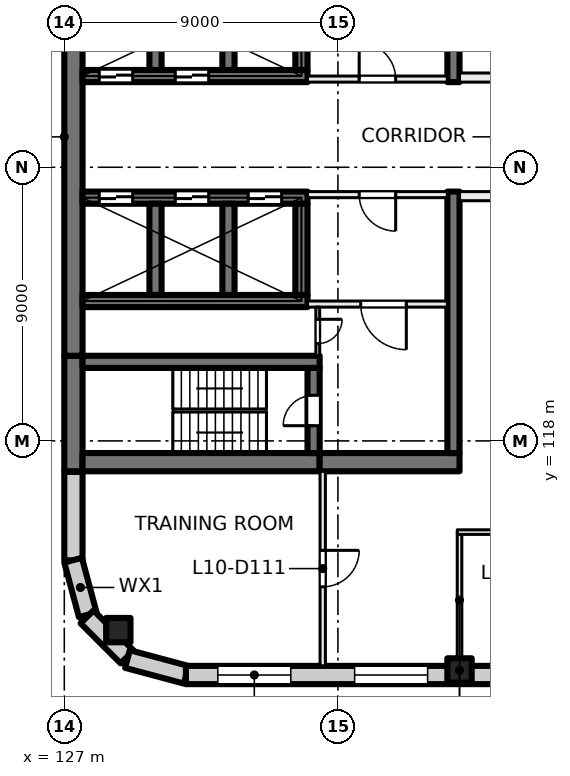
"""IFC4 building model, lengths in metres.
Left out: names, types, materials, properties, quantities, classifications, styles, units other than length and angle.
Written with IfcOpenShell. Run it as: python <this file> out.ifc"""

import sys

from ifc_helpers import new_model, si_unit, direction, frame, frame_2d, origin, origin_2d, place, context, subcontext, project, spatial, rectangle, extrude, element, fill, save


model = new_model("IFC4")
c1 = context("Model", 3, precision=1e-05, world=origin(), true_north=direction((0.0, 1.0)))
c2 = subcontext(c1, "Body", "Model", "MODEL_VIEW")
j1 = project(units=[si_unit("LENGTHUNIT", "METRE"), si_unit("PLANEANGLEUNIT", "RADIAN")], contexts=[c1])
p1 = place(None, origin())
s1 = spatial("IfcSite", under=j1, at=p1, CompositionType="ELEMENT")
p2 = place(p1, origin())
s2 = spatial("IfcBuilding", under=s1, at=p2, CompositionType="ELEMENT")
p3 = place(p2, frame((0.0, 0.0, 47.5)))
s3 = spatial("IfcBuildingStorey", under=s2, at=p3, CompositionType="ELEMENT", Elevation=47.5)
for number, where, z_axis, x_axis in (
    (1, (128.777, 111.777, 0.0), (0.0, 0.0, 1.0), (1.0, 0.0, 0.0)),
    (2, (140.0, 110.45, 0.0), (0.0, 0.0, 1.0), (1.0, 0.0, 0.0)),
):
    element("IfcColumn", number, at=place(p3, frame(where, z_axis=z_axis, x_axis=x_axis)), inside=s3, PredefinedType="COLUMN", context=c2, shape_type="SweptSolid", body=[
        extrude(rectangle(XDim=0.8, YDim=0.8, at=origin_2d()), origin(), (0.0, 0.0, 1.0), 4.0),
    ])
p4 = place(p3, frame((127.3, 117.0, 0.0), z_axis=(0.0, 0.0, 1.0), x_axis=(0.0, 1.0, 0.0)))
e3 = element("IfcWall", 3, at=p4, inside=s3, PredefinedType="SHEAR", context=c2, shape_type="SweptSolid", body=[
    extrude(rectangle(XDim=3.8, YDim=0.6, at=frame_2d((1.9, 0.0))), origin(), (0.0, 0.0, 1.0), 4.0),
])
p5 = place(p3, frame((127.3, 120.8, 0.0), z_axis=(0.0, 0.0, 1.0), x_axis=(0.0, 1.0, 0.0)))
e4 = element("IfcWall", 4, at=p5, inside=s3, PredefinedType="SHEAR", context=c2, shape_type="SweptSolid", body=[
    extrude(rectangle(XDim=14.4, YDim=0.6, at=frame_2d((7.2, 0.0))), origin(), (0.0, 0.0, 1.0), 4.0),
])
p6 = place(p3, frame((127.6, 117.3, 0.0), z_axis=(0.0, 0.0, 1.0), x_axis=(1.0, 0.0, 0.0)))
e5 = element("IfcWall", 5, at=p6, inside=s3, PredefinedType="SHEAR", context=c2, shape_type="SweptSolid", body=[
    extrude(rectangle(XDim=7.8, YDim=0.6, at=frame_2d((3.9, 0.0))), origin(), (0.0, 0.0, 1.0), 4.0),
])
p7 = place(p3, frame((135.4, 117.3, 0.0), z_axis=(0.0, 0.0, 1.0), x_axis=(1.0, 0.0, 0.0)))
e6 = element("IfcWall", 6, at=p7, inside=s3, PredefinedType="SHEAR", context=c2, shape_type="SweptSolid", body=[
    extrude(rectangle(XDim=4.6, YDim=0.6, at=frame_2d((2.3, 0.0))), origin(), (0.0, 0.0, 1.0), 4.0),
])
p8 = place(p3, frame((127.6, 120.6, 0.0), z_axis=(0.0, 0.0, 1.0), x_axis=(1.0, 0.0, 0.0)))
e7 = element("IfcWall", 7, at=p8, inside=s3, PredefinedType="SHEAR", context=c2, shape_type="SweptSolid", body=[
    extrude(rectangle(XDim=7.8, YDim=0.4, at=frame_2d((3.9, 0.0))), origin(), (0.0, 0.0, 1.0), 4.0),
])
p9 = place(p3, frame((135.2, 117.6, 0.0), z_axis=(0.0, 0.0, 1.0), x_axis=(0.0, 1.0, 0.0)))
e8 = element("IfcWall", 8, at=p9, inside=s3, PredefinedType="SHEAR", context=c2, shape_type="SweptSolid", body=[
    extrude(rectangle(XDim=2.8, YDim=0.4, at=frame_2d((1.4, 0.0))), origin(), (0.0, 0.0, 1.0), 4.0),
])
p10 = place(p9, frame((0.9, 0.0, 0.0)))
e9 = element("IfcOpeningElement", 9, at=p10, cuts=e8, PredefinedType="OPENING", context=c2, shape_type="SweptSolid", body=[
    extrude(rectangle(XDim=1.0, YDim=2.1, at=frame_2d((0.5, 1.05))), frame((0.0, 0.21, 0.0), z_axis=(0.0, -1.0, 0.0), x_axis=(1.0, 0.0, 0.0)), (0.0, 0.0, 1.0), 0.42),
])
p11 = place(p3, frame((127.6, 126.0, 0.0), z_axis=(0.0, 0.0, 1.0), x_axis=(1.0, 0.0, 0.0)))
e10 = element("IfcWall", 10, at=p11, inside=s3, PredefinedType="SHEAR", context=c2, shape_type="SweptSolid", body=[
    extrude(rectangle(XDim=7.4, YDim=0.4, at=frame_2d((3.7, 0.0))), origin(), (0.0, 0.0, 1.0), 4.0),
])
p12 = place(p11, frame((0.55, 0.0, 0.0)))
e11 = element("IfcOpeningElement", 11, at=p12, cuts=e10, PredefinedType="OPENING", context=c2, shape_type="SweptSolid", body=[
    extrude(rectangle(XDim=1.1, YDim=2.1, at=frame_2d((0.55, 1.05))), frame((0.0, 0.21, 0.0), z_axis=(0.0, -1.0, 0.0), x_axis=(1.0, 0.0, 0.0)), (0.0, 0.0, 1.0), 0.42),
])
p13 = place(p11, frame((3.05, 0.0, 0.0)))
e12 = element("IfcOpeningElement", 12, at=p13, cuts=e10, PredefinedType="OPENING", context=c2, shape_type="SweptSolid", body=[
    extrude(rectangle(XDim=1.1, YDim=2.1, at=frame_2d((0.55, 1.05))), frame((0.0, 0.21, 0.0), z_axis=(0.0, -1.0, 0.0), x_axis=(1.0, 0.0, 0.0)), (0.0, 0.0, 1.0), 0.42),
])
p14 = place(p11, frame((5.45, 0.0, 0.0)))
e13 = element("IfcOpeningElement", 13, at=p14, cuts=e10, PredefinedType="OPENING", context=c2, shape_type="SweptSolid", body=[
    extrude(rectangle(XDim=1.1, YDim=2.1, at=frame_2d((0.55, 1.05))), frame((0.0, 0.21, 0.0), z_axis=(0.0, -1.0, 0.0), x_axis=(1.0, 0.0, 0.0)), (0.0, 0.0, 1.0), 0.42),
])
p15 = place(p3, frame((127.6, 122.6, 0.0), z_axis=(0.0, 0.0, 1.0), x_axis=(1.0, 0.0, 0.0)))
e14 = element("IfcWall", 14, at=p15, inside=s3, PredefinedType="SHEAR", context=c2, shape_type="SweptSolid", body=[
    extrude(rectangle(XDim=7.4, YDim=0.4, at=frame_2d((3.7, 0.0))), origin(), (0.0, 0.0, 1.0), 4.0),
])
for number, where, z_axis, x_axis in (
    (15, (130.0, 122.8, 0.0), (0.0, 0.0, 1.0), (0.0, 1.0, 0.0)),
    (16, (132.4, 122.8, 0.0), (0.0, 0.0, 1.0), (0.0, 1.0, 0.0)),
    (17, (134.8, 122.8, 0.0), (0.0, 0.0, 1.0), (0.0, 1.0, 0.0)),
):
    element("IfcWall", number, at=place(p3, frame(where, z_axis=z_axis, x_axis=x_axis)), inside=s3, PredefinedType="SHEAR", context=c2, shape_type="SweptSolid", body=[
        extrude(rectangle(XDim=3.0, YDim=0.4, at=frame_2d((1.5, 0.0))), origin(), (0.0, 0.0, 1.0), 4.0),
    ])
p16 = place(p3, frame((127.6, 130.0, 0.0), z_axis=(0.0, 0.0, 1.0), x_axis=(1.0, 0.0, 0.0)))
e18 = element("IfcWall", 18, at=p16, inside=s3, PredefinedType="SHEAR", context=c2, shape_type="SweptSolid", body=[
    extrude(rectangle(XDim=7.4, YDim=0.4, at=frame_2d((3.7, 0.0))), origin(), (0.0, 0.0, 1.0), 4.0),
])
p17 = place(p16, frame((0.55, 0.0, 0.0)))
e19 = element("IfcOpeningElement", 19, at=p17, cuts=e18, PredefinedType="OPENING", context=c2, shape_type="SweptSolid", body=[
    extrude(rectangle(XDim=1.1, YDim=2.1, at=frame_2d((0.55, 1.05))), frame((0.0, 0.21, 0.0), z_axis=(0.0, -1.0, 0.0), x_axis=(1.0, 0.0, 0.0)), (0.0, 0.0, 1.0), 0.42),
])
p18 = place(p16, frame((3.05, 0.0, 0.0)))
e20 = element("IfcOpeningElement", 20, at=p18, cuts=e18, PredefinedType="OPENING", context=c2, shape_type="SweptSolid", body=[
    extrude(rectangle(XDim=1.1, YDim=2.1, at=frame_2d((0.55, 1.05))), frame((0.0, 0.21, 0.0), z_axis=(0.0, -1.0, 0.0), x_axis=(1.0, 0.0, 0.0)), (0.0, 0.0, 1.0), 0.42),
])
for number, where, z_axis, x_axis in (
    (21, (130.0, 130.2, 0.0), (0.0, 0.0, 1.0), (0.0, 1.0, 0.0)),
    (22, (132.4, 130.2, 0.0), (0.0, 0.0, 1.0), (0.0, 1.0, 0.0)),
):
    element("IfcWall", number, at=place(p3, frame(where, z_axis=z_axis, x_axis=x_axis)), inside=s3, PredefinedType="SHEAR", context=c2, shape_type="SweptSolid", body=[
        extrude(rectangle(XDim=3.0, YDim=0.4, at=frame_2d((1.5, 0.0))), origin(), (0.0, 0.0, 1.0), 4.0),
    ])
p19 = place(p3, frame((134.8, 130.2, 0.0), z_axis=(0.0, 0.0, 1.0), x_axis=(0.0, 1.0, 0.0)))
e23 = element("IfcWall", 23, at=p19, inside=s3, PredefinedType="SHEAR", context=c2, shape_type="SweptSolid", body=[
    extrude(rectangle(XDim=3.0, YDim=0.4, at=frame_2d((1.5, 0.0))), origin(), (0.0, 0.0, 1.0), 4.0),
])
p20 = place(p19, frame((0.95, 0.0, 0.0)))
e24 = element("IfcOpeningElement", 24, at=p20, cuts=e23, PredefinedType="OPENING", context=c2, shape_type="SweptSolid", body=[
    extrude(rectangle(XDim=1.1, YDim=2.1, at=frame_2d((0.55, 1.05))), frame((0.0, 0.21, 0.0), z_axis=(0.0, -1.0, 0.0), x_axis=(1.0, 0.0, 0.0)), (0.0, 0.0, 1.0), 0.42),
])
for number, where, z_axis, x_axis in (
    (25, (139.8, 117.6, 0.0), (0.0, 0.0, 1.0), (0.0, 1.0, 0.0)),
    (26, (139.8, 129.8, 0.0), (0.0, 0.0, 1.0), (0.0, 1.0, 0.0)),
):
    element("IfcWall", number, at=place(p3, frame(where, z_axis=z_axis, x_axis=x_axis)), inside=s3, PredefinedType="SHEAR", context=c2, shape_type="SweptSolid", body=[
        extrude(rectangle(XDim=8.6, YDim=0.4, at=frame_2d((4.3, 0.0))), origin(), (0.0, 0.0, 1.0), 4.0),
    ])
p21 = place(p3, frame((127.3, 114.07, 0.0), z_axis=(0.0, 0.0, 1.0), x_axis=(0.0, 1.0, 0.0)))
e27 = element("IfcWall", 27, at=p21, inside=s3, PredefinedType="SOLIDWALL", context=c2, shape_type="SweptSolid", body=[
    extrude(rectangle(XDim=2.91, YDim=0.6, at=frame_2d((1.455, 0.0))), origin(), (0.0, 0.0, 1.0), 3.625),
])
for number, where, z_axis, x_axis in (
    (28, (127.771, 112.281, 0.0), (0.0, 0.0, 1.0), (-0.259, 0.966, 0.0)),
    (29, (129.064, 110.896, 0.0), (0.0, 0.0, 1.0), (-0.707, 0.707, 0.0)),
):
    element("IfcWall", number, at=place(p3, frame(where, z_axis=z_axis, x_axis=x_axis)), inside=s3, PredefinedType="SOLIDWALL", context=c2, shape_type="SweptSolid", body=[
        extrude(rectangle(XDim=1.861, YDim=0.6, at=frame_2d((0.93, 0.0))), origin(), (0.0, 0.0, 1.0), 3.625),
    ])
p22 = place(p3, frame((131.01, 110.308, 0.0), z_axis=(0.0, 0.0, 1.0), x_axis=(-0.965920269068, 0.258839784042, 0.0)))
e30 = element("IfcWall", 30, at=p22, inside=s3, PredefinedType="SOLIDWALL", context=c2, shape_type="SweptSolid", body=[
    extrude(rectangle(XDim=2.0, YDim=0.6, at=frame_2d((1.0, 0.0))), origin(), (0.0, 0.0, 1.0), 3.625),
])
p23 = place(p3, frame((162.93, 110.3, 0.0), z_axis=(0.0, 0.0, 1.0), x_axis=(-1.0, 0.0, 0.0)))
e31 = element("IfcWall", 31, at=p23, inside=s3, PredefinedType="SOLIDWALL", context=c2, shape_type="SweptSolid", body=[
    extrude(rectangle(XDim=31.93, YDim=0.6, at=frame_2d((15.965, 0.0))), origin(), (0.0, 0.0, 1.0), 3.625),
])
p24 = place(p23, frame((1.48, 0.0, 0.9)))
e32 = element("IfcOpeningElement", 32, at=p24, cuts=e31, PredefinedType="OPENING", context=c2, shape_type="SweptSolid", body=[
    extrude(rectangle(XDim=2.4, YDim=2.4, at=frame_2d((1.2, 1.2))), frame((0.0, 0.31, 0.0), z_axis=(0.0, -1.0, 0.0), x_axis=(1.0, 0.0, 0.0)), (0.0, 0.0, 1.0), 0.62),
])
p25 = place(p23, frame((5.98, 0.0, 0.9)))
e33 = element("IfcOpeningElement", 33, at=p25, cuts=e31, PredefinedType="OPENING", context=c2, shape_type="SweptSolid", body=[
    extrude(rectangle(XDim=2.4, YDim=2.4, at=frame_2d((1.2, 1.2))), frame((0.0, 0.31, 0.0), z_axis=(0.0, -1.0, 0.0), x_axis=(1.0, 0.0, 0.0)), (0.0, 0.0, 1.0), 0.62),
])
p26 = place(p23, frame((10.48, 0.0, 0.9)))
e34 = element("IfcOpeningElement", 34, at=p26, cuts=e31, PredefinedType="OPENING", context=c2, shape_type="SweptSolid", body=[
    extrude(rectangle(XDim=2.4, YDim=2.4, at=frame_2d((1.2, 1.2))), frame((0.0, 0.31, 0.0), z_axis=(0.0, -1.0, 0.0), x_axis=(1.0, 0.0, 0.0)), (0.0, 0.0, 1.0), 0.62),
])
p27 = place(p23, frame((14.98, 0.0, 0.9)))
e35 = element("IfcOpeningElement", 35, at=p27, cuts=e31, PredefinedType="OPENING", context=c2, shape_type="SweptSolid", body=[
    extrude(rectangle(XDim=2.4, YDim=2.4, at=frame_2d((1.2, 1.2))), frame((0.0, 0.31, 0.0), z_axis=(0.0, -1.0, 0.0), x_axis=(1.0, 0.0, 0.0)), (0.0, 0.0, 1.0), 0.62),
])
p28 = place(p23, frame((19.48, 0.0, 0.9)))
e36 = element("IfcOpeningElement", 36, at=p28, cuts=e31, PredefinedType="OPENING", context=c2, shape_type="SweptSolid", body=[
    extrude(rectangle(XDim=2.4, YDim=2.4, at=frame_2d((1.2, 1.2))), frame((0.0, 0.31, 0.0), z_axis=(0.0, -1.0, 0.0), x_axis=(1.0, 0.0, 0.0)), (0.0, 0.0, 1.0), 0.62),
])
p29 = place(p23, frame((23.98, 0.0, 0.9)))
e37 = element("IfcOpeningElement", 37, at=p29, cuts=e31, PredefinedType="OPENING", context=c2, shape_type="SweptSolid", body=[
    extrude(rectangle(XDim=2.4, YDim=2.4, at=frame_2d((1.2, 1.2))), frame((0.0, 0.31, 0.0), z_axis=(0.0, -1.0, 0.0), x_axis=(1.0, 0.0, 0.0)), (0.0, 0.0, 1.0), 0.62),
])
p30 = place(p23, frame((28.48, 0.0, 0.9)))
e38 = element("IfcOpeningElement", 38, at=p30, cuts=e31, PredefinedType="OPENING", context=c2, shape_type="SweptSolid", body=[
    extrude(rectangle(XDim=2.4, YDim=2.4, at=frame_2d((1.2, 1.2))), frame((0.0, 0.31, 0.0), z_axis=(0.0, -1.0, 0.0), x_axis=(1.0, 0.0, 0.0)), (0.0, 0.0, 1.0), 0.62),
])
p31 = place(p3, frame((135.0, 129.9, 0.0), z_axis=(0.0, 0.0, 1.0), x_axis=(1.0, 0.0, 0.0)))
e39 = element("IfcWall", 39, at=p31, inside=s3, PredefinedType="PARTITIONING", context=c2, shape_type="SweptSolid", body=[
    extrude(rectangle(XDim=4.6, YDim=0.2, at=frame_2d((2.3, 0.0))), origin(), (0.0, 0.0, 1.0), 3.625),
])
p32 = place(p31, frame((1.7, 0.0, 0.0)))
e40 = element("IfcOpeningElement", 40, at=p32, cuts=e39, PredefinedType="OPENING", context=c2, shape_type="SweptSolid", body=[
    extrude(rectangle(XDim=1.2, YDim=2.1, at=frame_2d((0.6, 1.05))), frame((0.0, 0.11, 0.0), z_axis=(0.0, -1.0, 0.0), x_axis=(1.0, 0.0, 0.0)), (0.0, 0.0, 1.0), 0.22),
])
p33 = place(p3, frame((139.6, 126.1, 0.0), z_axis=(0.0, 0.0, 1.0), x_axis=(-1.0, 0.0, 0.0)))
e41 = element("IfcWall", 41, at=p33, inside=s3, PredefinedType="PARTITIONING", context=c2, shape_type="SweptSolid", body=[
    extrude(rectangle(XDim=4.6, YDim=0.2, at=frame_2d((2.3, 0.0))), origin(), (0.0, 0.0, 1.0), 3.625),
])
p34 = place(p33, frame((1.7, 0.0, 0.0)))
e42 = element("IfcOpeningElement", 42, at=p34, cuts=e41, PredefinedType="OPENING", context=c2, shape_type="SweptSolid", body=[
    extrude(rectangle(XDim=1.2, YDim=2.1, at=frame_2d((0.6, 1.05))), frame((0.0, 0.11, 0.0), z_axis=(0.0, -1.0, 0.0), x_axis=(1.0, 0.0, 0.0)), (0.0, 0.0, 1.0), 0.22),
])
p35 = place(p3, frame((139.6, 122.5, 0.0), z_axis=(0.0, 0.0, 1.0), x_axis=(-1.0, 0.0, 0.0)))
e43 = element("IfcWall", 43, at=p35, inside=s3, PredefinedType="PARTITIONING", context=c2, shape_type="SweptSolid", body=[
    extrude(rectangle(XDim=4.6, YDim=0.2, at=frame_2d((2.3, 0.0))), origin(), (0.0, 0.0, 1.0), 3.625),
])
p36 = place(p35, frame((1.35, 0.0, 0.0)))
e44 = element("IfcOpeningElement", 44, at=p36, cuts=e43, PredefinedType="OPENING", context=c2, shape_type="SweptSolid", body=[
    extrude(rectangle(XDim=1.5, YDim=2.1, at=frame_2d((0.75, 1.05))), frame((0.0, 0.11, 0.0), z_axis=(0.0, -1.0, 0.0), x_axis=(1.0, 0.0, 0.0)), (0.0, 0.0, 1.0), 0.22),
])
p37 = place(p3, frame((135.337, 122.4, 0.0), z_axis=(0.0, 0.0, 1.0), x_axis=(0.0, -1.0, 0.0)))
e45 = element("IfcWall", 45, at=p37, inside=s3, PredefinedType="PARTITIONING", context=c2, shape_type="SweptSolid", body=[
    extrude(rectangle(XDim=1.6, YDim=0.125, at=frame_2d((0.8, 0.0))), origin(), (0.0, 0.0, 1.0), 3.625),
])
p38 = place(p37, frame((0.4, 0.0, 0.0)))
e46 = element("IfcOpeningElement", 46, at=p38, cuts=e45, PredefinedType="OPENING", context=c2, shape_type="SweptSolid", body=[
    extrude(rectangle(XDim=0.8, YDim=2.1, at=frame_2d((0.4, 1.05))), frame((0.0, 0.073, 0.0), z_axis=(0.0, -1.0, 0.0), x_axis=(1.0, 0.0, 0.0)), (0.0, 0.0, 1.0), 0.145),
])
p39 = place(p3, frame((135.5, 117.0, 0.0), z_axis=(0.0, 0.0, 1.0), x_axis=(0.0, -1.0, 0.0)))
e47 = element("IfcWall", 47, at=p39, inside=s3, PredefinedType="PARTITIONING", context=c2, shape_type="SweptSolid", body=[
    extrude(rectangle(XDim=6.4, YDim=0.175, at=frame_2d((3.2, 0.0))), origin(), (0.0, 0.0, 1.0), 3.625),
])
p40 = place(p39, frame((2.6, 0.0, 0.0)))
e48 = element("IfcOpeningElement", 48, at=p40, cuts=e47, PredefinedType="OPENING", context=c2, shape_type="SweptSolid", body=[
    extrude(rectangle(XDim=1.2, YDim=2.1, at=frame_2d((0.6, 1.05))), frame((0.0, 0.097, 0.0), z_axis=(0.0, -1.0, 0.0), x_axis=(1.0, 0.0, 0.0)), (0.0, 0.0, 1.0), 0.195),
])
p41 = place(p3, frame((140.0, 110.6, 0.0), z_axis=(0.0, 0.0, 1.0), x_axis=(0.0, 1.0, 0.0)))
e49 = element("IfcWall", 49, at=p41, inside=s3, PredefinedType="PARTITIONING", context=c2, shape_type="SweptSolid", body=[
    extrude(rectangle(XDim=4.325, YDim=0.15, at=frame_2d((2.163, 0.0))), origin(), (0.0, 0.0, 1.0), 3.625),
])
p42 = place(p3, frame((139.925, 115.0, 0.0), z_axis=(0.0, 0.0, 1.0), x_axis=(1.0, 0.0, 0.0)))
e50 = element("IfcWall", 50, at=p42, inside=s3, PredefinedType="PARTITIONING", context=c2, shape_type="SweptSolid", body=[
    extrude(rectangle(XDim=4.65, YDim=0.15, at=frame_2d((2.325, 0.0))), origin(), (0.0, 0.0, 1.0), 3.625),
])
p43 = place(p42, frame((1.825, 0.0, 0.0)))
e51 = element("IfcOpeningElement", 51, at=p43, cuts=e50, PredefinedType="OPENING", context=c2, shape_type="SweptSolid", body=[
    extrude(rectangle(XDim=1.0, YDim=2.1, at=frame_2d((0.5, 1.05))), frame((0.0, 0.085, 0.0), z_axis=(0.0, -1.0, 0.0), x_axis=(1.0, 0.0, 0.0)), (0.0, 0.0, 1.0), 0.17),
])
p44 = place(p3, frame((140.0, 129.95, 0.0), z_axis=(0.0, 0.0, 1.0), x_axis=(1.0, 0.0, 0.0)))
e52 = element("IfcWall", 52, at=p44, inside=s3, PredefinedType="PARTITIONING", context=c2, shape_type="SweptSolid", body=[
    extrude(rectangle(XDim=14.0, YDim=0.3, at=frame_2d((7.0, 0.0))), origin(), (0.0, 0.0, 1.0), 3.625),
])
p45 = place(p44, frame((2.75, 0.0, 0.0)))
e53 = element("IfcOpeningElement", 53, at=p45, cuts=e52, PredefinedType="OPENING", context=c2, shape_type="SweptSolid", body=[
    extrude(rectangle(XDim=1.0, YDim=2.1, at=frame_2d((0.5, 1.05))), frame((0.0, 0.16, 0.0), z_axis=(0.0, -1.0, 0.0), x_axis=(1.0, 0.0, 0.0)), (0.0, 0.0, 1.0), 0.32),
])
p46 = place(p44, frame((10.6, 0.0, 0.0)))
e54 = element("IfcOpeningElement", 54, at=p46, cuts=e52, PredefinedType="OPENING", context=c2, shape_type="SweptSolid", body=[
    extrude(rectangle(XDim=1.8, YDim=2.1, at=frame_2d((0.9, 1.05))), frame((0.0, 0.16, 0.0), z_axis=(0.0, -1.0, 0.0), x_axis=(1.0, 0.0, 0.0)), (0.0, 0.0, 1.0), 0.32),
])
p47 = place(p3, frame((154.0, 126.05, 0.0), z_axis=(0.0, 0.0, 1.0), x_axis=(-1.0, 0.0, 0.0)))
e55 = element("IfcWall", 55, at=p47, inside=s3, PredefinedType="PARTITIONING", context=c2, shape_type="SweptSolid", body=[
    extrude(rectangle(XDim=14.0, YDim=0.3, at=frame_2d((7.0, 0.0))), origin(), (0.0, 0.0, 1.0), 3.625),
])
p48 = place(p47, frame((6.1, 0.0, 0.0)))
e56 = element("IfcOpeningElement", 56, at=p48, cuts=e55, PredefinedType="OPENING", context=c2, shape_type="SweptSolid", body=[
    extrude(rectangle(XDim=1.8, YDim=2.1, at=frame_2d((0.9, 1.05))), frame((0.0, 0.16, 0.0), z_axis=(0.0, -1.0, 0.0), x_axis=(1.0, 0.0, 0.0)), (0.0, 0.0, 1.0), 0.32),
])
p49 = place(p29, origin())
e57 = element("IfcWindow", 57, at=p49, inside=s3, PartitioningType="SINGLE_PANEL", PredefinedType="WINDOW", context=c2, shape_type="SweptSolid", body=[
    extrude(rectangle(XDim=2.4, YDim=2.4, at=frame_2d((1.2, 1.2))), frame((0.0, 0.03, 0.0), z_axis=(0.0, -1.0, 0.0), x_axis=(1.0, 0.0, 0.0)), (0.0, 0.0, 1.0), 0.06),
])
fill(e37, e57)
p50 = place(p30, origin())
e58 = element("IfcWindow", 58, at=p50, inside=s3, PartitioningType="SINGLE_PANEL", PredefinedType="WINDOW", context=c2, shape_type="SweptSolid", body=[
    extrude(rectangle(XDim=2.4, YDim=2.4, at=frame_2d((1.2, 1.2))), frame((0.0, 0.03, 0.0), z_axis=(0.0, -1.0, 0.0), x_axis=(1.0, 0.0, 0.0)), (0.0, 0.0, 1.0), 0.06),
])
fill(e38, e58)
p51 = place(p17, origin())
e59 = element("IfcDoor", 59, at=p51, inside=s3, OperationType="DOUBLE_DOOR_SLIDING", PredefinedType="DOOR", context=c2, shape_type="SweptSolid", body=[
    extrude(rectangle(XDim=1.1, YDim=2.1, at=frame_2d((0.55, 1.05))), frame((0.0, 0.025, 0.0), z_axis=(0.0, -1.0, 0.0), x_axis=(1.0, 0.0, 0.0)), (0.0, 0.0, 1.0), 0.05),
])
fill(e19, e59)
p52 = place(p18, origin())
e60 = element("IfcDoor", 60, at=p52, inside=s3, OperationType="DOUBLE_DOOR_SLIDING", PredefinedType="DOOR", context=c2, shape_type="SweptSolid", body=[
    extrude(rectangle(XDim=1.1, YDim=2.1, at=frame_2d((0.55, 1.05))), frame((0.0, 0.025, 0.0), z_axis=(0.0, -1.0, 0.0), x_axis=(1.0, 0.0, 0.0)), (0.0, 0.0, 1.0), 0.05),
])
fill(e20, e60)
p53 = place(p12, origin())
e61 = element("IfcDoor", 61, at=p53, inside=s3, OperationType="DOUBLE_DOOR_SLIDING", PredefinedType="DOOR", context=c2, shape_type="SweptSolid", body=[
    extrude(rectangle(XDim=1.1, YDim=2.1, at=frame_2d((0.55, 1.05))), frame((0.0, 0.025, 0.0), z_axis=(0.0, -1.0, 0.0), x_axis=(1.0, 0.0, 0.0)), (0.0, 0.0, 1.0), 0.05),
])
fill(e11, e61)
p54 = place(p13, origin())
e62 = element("IfcDoor", 62, at=p54, inside=s3, OperationType="DOUBLE_DOOR_SLIDING", PredefinedType="DOOR", context=c2, shape_type="SweptSolid", body=[
    extrude(rectangle(XDim=1.1, YDim=2.1, at=frame_2d((0.55, 1.05))), frame((0.0, 0.025, 0.0), z_axis=(0.0, -1.0, 0.0), x_axis=(1.0, 0.0, 0.0)), (0.0, 0.0, 1.0), 0.05),
])
fill(e12, e62)
p55 = place(p14, origin())
e63 = element("IfcDoor", 63, at=p55, inside=s3, OperationType="DOUBLE_DOOR_SLIDING", PredefinedType="DOOR", context=c2, shape_type="SweptSolid", body=[
    extrude(rectangle(XDim=1.1, YDim=2.1, at=frame_2d((0.55, 1.05))), frame((0.0, 0.025, 0.0), z_axis=(0.0, -1.0, 0.0), x_axis=(1.0, 0.0, 0.0)), (0.0, 0.0, 1.0), 0.05),
])
fill(e13, e63)
p56 = place(p32, origin())
e64 = element("IfcDoor", 64, at=p56, inside=s3, OperationType="DOUBLE_DOOR_SINGLE_SWING", PredefinedType="DOOR", context=c2, shape_type="SweptSolid", body=[
    extrude(rectangle(XDim=1.2, YDim=2.1, at=frame_2d((0.6, 1.05))), frame((0.0, 0.025, 0.0), z_axis=(0.0, -1.0, 0.0), x_axis=(1.0, 0.0, 0.0)), (0.0, 0.0, 1.0), 0.05),
])
fill(e40, e64)
p57 = place(p34, origin())
e65 = element("IfcDoor", 65, at=p57, inside=s3, OperationType="DOUBLE_DOOR_SINGLE_SWING", PredefinedType="DOOR", context=c2, shape_type="SweptSolid", body=[
    extrude(rectangle(XDim=1.2, YDim=2.1, at=frame_2d((0.6, 1.05))), frame((0.0, 0.025, 0.0), z_axis=(0.0, -1.0, 0.0), x_axis=(1.0, 0.0, 0.0)), (0.0, 0.0, 1.0), 0.05),
])
fill(e42, e65)
p58 = place(p36, origin())
e66 = element("IfcDoor", 66, at=p58, inside=s3, OperationType="DOUBLE_DOOR_SINGLE_SWING", PredefinedType="DOOR", context=c2, shape_type="SweptSolid", body=[
    extrude(rectangle(XDim=1.5, YDim=2.1, at=frame_2d((0.75, 1.05))), frame((0.0, 0.025, 0.0), z_axis=(0.0, -1.0, 0.0), x_axis=(1.0, 0.0, 0.0)), (0.0, 0.0, 1.0), 0.05),
])
fill(e44, e66)
p59 = place(p10, origin())
e67 = element("IfcDoor", 67, at=p59, inside=s3, OperationType="SINGLE_SWING_RIGHT", PredefinedType="DOOR", context=c2, shape_type="SweptSolid", body=[
    extrude(rectangle(XDim=1.0, YDim=2.1, at=frame_2d((0.5, 1.05))), frame((0.0, 0.025, 0.0), z_axis=(0.0, -1.0, 0.0), x_axis=(1.0, 0.0, 0.0)), (0.0, 0.0, 1.0), 0.05),
])
fill(e9, e67)
p60 = place(p38, origin())
e68 = element("IfcDoor", 68, at=p60, inside=s3, OperationType="SINGLE_SWING_LEFT", PredefinedType="DOOR", context=c2, shape_type="SweptSolid", body=[
    extrude(rectangle(XDim=0.8, YDim=2.1, at=frame_2d((0.4, 1.05))), frame((0.0, 0.025, 0.0), z_axis=(0.0, -1.0, 0.0), x_axis=(1.0, 0.0, 0.0)), (0.0, 0.0, 1.0), 0.05),
])
fill(e46, e68)
p61 = place(p40, origin())
e69 = element("IfcDoor", 69, at=p61, inside=s3, OperationType="DOUBLE_DOOR_SINGLE_SWING", PredefinedType="DOOR", context=c2, shape_type="SweptSolid", body=[
    extrude(rectangle(XDim=1.2, YDim=2.1, at=frame_2d((0.6, 1.05))), frame((0.0, 0.025, 0.0), z_axis=(0.0, -1.0, 0.0), x_axis=(1.0, 0.0, 0.0)), (0.0, 0.0, 1.0), 0.05),
])
fill(e48, e69)
save(model, sys.argv[1])
